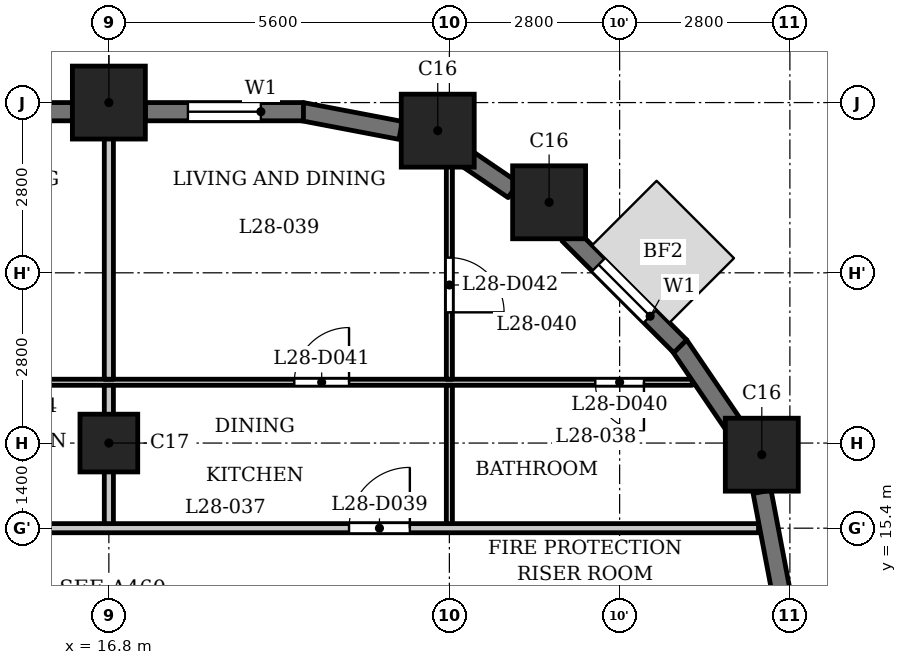
"""IFC4 building model, lengths in metres.
Left out: names, types, materials, properties, quantities, classifications, styles, units other than length and angle.
Written with IfcOpenShell. Run it as: python <this file> out.ifc"""

import sys

from ifc_helpers import new_model, si_unit, direction, frame, frame_2d, origin, origin_2d, place, context, subcontext, project, spatial, rectangle, extrude, element, fill, save


model = new_model("IFC4")
c1 = context("Model", 3, precision=1e-05, world=origin(), true_north=direction((0.0, 1.0)))
c2 = subcontext(c1, "Body", "Model", "MODEL_VIEW")
j1 = project(units=[si_unit("LENGTHUNIT", "METRE"), si_unit("PLANEANGLEUNIT", "RADIAN")], contexts=[c1])
p1 = place(None, origin())
s1 = spatial("IfcSite", under=j1, at=p1, CompositionType="ELEMENT")
p2 = place(p1, origin())
s2 = spatial("IfcBuilding", under=s1, at=p2, CompositionType="ELEMENT")
p3 = place(p2, frame((0.0, 0.0, 111.3)))
s3 = spatial("IfcBuildingStorey", under=s2, at=p3, CompositionType="ELEMENT", Elevation=111.3)
for number, where, z_axis, x_axis in (
    (1, (27.538, 16.609, 0.0), (0.0, 0.0, 1.0), (1.0, 0.0, 0.0)),
    (2, (24.04, 20.76, 0.0), (0.0, 0.0, 1.0), (1.0, 0.0, 0.0)),
    (3, (22.209, 21.938, 0.0), (0.0, 0.0, 1.0), (1.0, 0.0, 0.0)),
    (4, (16.8, 22.4, 0.0), (0.0, 0.0, 1.0), (1.0, 0.0, 0.0)),
):
    element("IfcColumn", number, at=place(p3, frame(where, z_axis=z_axis, x_axis=x_axis)), inside=s3, PredefinedType="COLUMN", context=c2, shape_type="SweptSolid", body=[
        extrude(rectangle(XDim=1.2, YDim=1.2, at=origin_2d()), origin(), (0.0, 0.0, 1.0), 3.5),
    ])
p4 = place(p3, frame((16.8, 16.8, 0.0), z_axis=(0.0, 0.0, 1.0), x_axis=(1.0, 0.0, 0.0)))
e5 = element("IfcColumn", 5, at=p4, inside=s3, PredefinedType="COLUMN", context=c2, shape_type="SweptSolid", body=[
    extrude(rectangle(XDim=0.95, YDim=0.95, at=origin_2d()), origin(), (0.0, 0.0, 1.0), 3.5),
])
for number, where, z_axis, x_axis in (
    (6, (27.853, 14.372, 0.0), (0.0, 0.0, 1.0), (-0.187, 0.982, 0.0)),
    (7, (27.11, 17.043, 0.0), (0.0, 0.0, 1.0), (-0.562, 0.827, 0.0)),
):
    element("IfcWall", number, at=place(p3, frame(where, z_axis=z_axis, x_axis=x_axis)), inside=s3, PredefinedType="SOLIDWALL", context=c2, shape_type="SweptSolid", body=[
        extrude(rectangle(XDim=1.656, YDim=0.3, at=frame_2d((0.828, 0.0))), origin(), (0.0, 0.0, 1.0), 2.4),
    ])
p5 = place(p3, frame((26.197, 18.391, 0.0), z_axis=(0.0, 0.0, 1.0), x_axis=(-0.707059830104, 0.707153729152, 0.0)))
e8 = element("IfcWall", 8, at=p5, inside=s3, PredefinedType="SOLIDWALL", context=c2, shape_type="SweptSolid", body=[
    extrude(rectangle(XDim=2.6, YDim=0.3, at=frame_2d((1.3, 0.0))), origin(), (0.0, 0.0, 1.0), 2.4),
])
p6 = place(p5, frame((0.7, 0.0, 0.6)))
e9 = element("IfcOpeningElement", 9, at=p6, cuts=e8, PredefinedType="OPENING", context=c2, shape_type="SweptSolid", body=[
    extrude(rectangle(XDim=1.2, YDim=1.55, at=frame_2d((0.6, 0.775))), frame((0.0, 0.16, 0.0), z_axis=(0.0, -1.0, 0.0), x_axis=(1.0, 0.0, 0.0)), (0.0, 0.0, 1.0), 0.32),
])
p7 = place(p3, frame((23.451, 20.96, 0.0), z_axis=(0.0, 0.0, 1.0), x_axis=(-0.827019434577, 0.562173331661, 0.0)))
e10 = element("IfcWall", 10, at=p7, inside=s3, PredefinedType="SOLIDWALL", context=c2, shape_type="SweptSolid", body=[
    extrude(rectangle(XDim=0.977, YDim=0.3, at=frame_2d((0.489, 0.0))), origin(), (0.0, 0.0, 1.0), 3.2),
])
p8 = place(p3, frame((21.599, 21.942, 0.0), z_axis=(0.0, 0.0, 1.0), x_axis=(-0.98228820662, 0.187376303559, 0.0)))
e11 = element("IfcWall", 11, at=p8, inside=s3, PredefinedType="SOLIDWALL", context=c2, shape_type="SweptSolid", body=[
    extrude(rectangle(XDim=1.656, YDim=0.3, at=frame_2d((0.828, 0.0))), origin(), (0.0, 0.0, 1.0), 2.4),
])
p9 = place(p3, frame((20.0, 22.25, 0.0), z_axis=(0.0, 0.0, 1.0), x_axis=(-1.0, 0.0, 0.0)))
e12 = element("IfcWall", 12, at=p9, inside=s3, PredefinedType="SOLIDWALL", context=c2, shape_type="SweptSolid", body=[
    extrude(rectangle(XDim=2.6, YDim=0.3, at=frame_2d((1.3, 0.0))), origin(), (0.0, 0.0, 1.0), 2.4),
])
p10 = place(p9, frame((0.7, 0.0, 0.6)))
e13 = element("IfcOpeningElement", 13, at=p10, cuts=e12, PredefinedType="OPENING", context=c2, shape_type="SweptSolid", body=[
    extrude(rectangle(XDim=1.2, YDim=1.55, at=frame_2d((0.6, 0.775))), frame((0.0, 0.16, 0.0), z_axis=(0.0, -1.0, 0.0), x_axis=(1.0, 0.0, 0.0)), (0.0, 0.0, 1.0), 0.32),
])
p11 = place(p3, frame((16.2, 22.25, 0.0), z_axis=(0.0, 0.0, 1.0), x_axis=(-1.0, 0.0, 0.0)))
e14 = element("IfcWall", 14, at=p11, inside=s3, PredefinedType="SOLIDWALL", context=c2, shape_type="SweptSolid", body=[
    extrude(rectangle(XDim=4.4, YDim=0.3, at=frame_2d((2.2, 0.0))), origin(), (0.0, 0.0, 1.0), 2.4),
])
p12 = place(p11, frame((0.4, 0.0, 1.2)))
e15 = element("IfcOpeningElement", 15, at=p12, cuts=e14, PredefinedType="OPENING", context=c2, shape_type="SweptSolid", body=[
    extrude(rectangle(XDim=3.6, YDim=0.95, at=frame_2d((1.8, 0.475))), frame((0.0, 0.16, 0.0), z_axis=(0.0, -1.0, 0.0), x_axis=(1.0, 0.0, 0.0)), (0.0, 0.0, 1.0), 0.32),
])
p13 = place(p3, frame((-27.484, 15.4, 0.0), z_axis=(0.0, 0.0, 1.0), x_axis=(1.0, 0.0, 0.0)))
e16 = element("IfcWall", 16, at=p13, inside=s3, PredefinedType="PARTITIONING", context=c2, shape_type="SweptSolid", body=[
    extrude(rectangle(XDim=54.968, YDim=0.15, at=frame_2d((27.484, 0.0))), origin(), (0.0, 0.0, 1.0), 3.2),
])
p14 = place(p13, frame((9.034, 0.0, 0.0)))
e17 = element("IfcOpeningElement", 17, at=p14, cuts=e16, PredefinedType="OPENING", context=c2, shape_type="SweptSolid", body=[
    extrude(rectangle(XDim=1.0, YDim=2.1, at=frame_2d((0.5, 1.05))), frame((0.0, 0.085, 0.0), z_axis=(0.0, -1.0, 0.0), x_axis=(1.0, 0.0, 0.0)), (0.0, 0.0, 1.0), 0.17),
])
p15 = place(p13, frame((14.634, 0.0, 0.0)))
e18 = element("IfcOpeningElement", 18, at=p15, cuts=e16, PredefinedType="OPENING", context=c2, shape_type="SweptSolid", body=[
    extrude(rectangle(XDim=1.0, YDim=2.1, at=frame_2d((0.5, 1.05))), frame((0.0, 0.085, 0.0), z_axis=(0.0, -1.0, 0.0), x_axis=(1.0, 0.0, 0.0)), (0.0, 0.0, 1.0), 0.17),
])
p16 = place(p13, frame((16.984, 0.0, 0.0)))
e19 = element("IfcOpeningElement", 19, at=p16, cuts=e16, PredefinedType="OPENING", context=c2, shape_type="SweptSolid", body=[
    extrude(rectangle(XDim=1.0, YDim=2.1, at=frame_2d((0.5, 1.05))), frame((0.0, 0.085, 0.0), z_axis=(0.0, -1.0, 0.0), x_axis=(1.0, 0.0, 0.0)), (0.0, 0.0, 1.0), 0.17),
])
p17 = place(p13, frame((28.084, 0.0, 0.0)))
e20 = element("IfcOpeningElement", 20, at=p17, cuts=e16, PredefinedType="OPENING", context=c2, shape_type="SweptSolid", body=[
    extrude(rectangle(XDim=1.0, YDim=2.1, at=frame_2d((0.5, 1.05))), frame((0.0, 0.085, 0.0), z_axis=(0.0, -1.0, 0.0), x_axis=(1.0, 0.0, 0.0)), (0.0, 0.0, 1.0), 0.17),
])
p18 = place(p13, frame((34.834, 0.0, 0.0)))
e21 = element("IfcOpeningElement", 21, at=p18, cuts=e16, PredefinedType="OPENING", context=c2, shape_type="SweptSolid", body=[
    extrude(rectangle(XDim=1.0, YDim=2.1, at=frame_2d((0.5, 1.05))), frame((0.0, 0.085, 0.0), z_axis=(0.0, -1.0, 0.0), x_axis=(1.0, 0.0, 0.0)), (0.0, 0.0, 1.0), 0.17),
])
p19 = place(p13, frame((41.884, 0.0, 0.0)))
e22 = element("IfcOpeningElement", 22, at=p19, cuts=e16, PredefinedType="OPENING", context=c2, shape_type="SweptSolid", body=[
    extrude(rectangle(XDim=1.0, YDim=2.1, at=frame_2d((0.5, 1.05))), frame((0.0, 0.085, 0.0), z_axis=(0.0, -1.0, 0.0), x_axis=(1.0, 0.0, 0.0)), (0.0, 0.0, 1.0), 0.17),
])
p20 = place(p13, frame((48.234, 0.0, 0.0)))
e23 = element("IfcOpeningElement", 23, at=p20, cuts=e16, PredefinedType="OPENING", context=c2, shape_type="SweptSolid", body=[
    extrude(rectangle(XDim=1.0, YDim=2.1, at=frame_2d((0.5, 1.05))), frame((0.0, 0.085, 0.0), z_axis=(0.0, -1.0, 0.0), x_axis=(1.0, 0.0, 0.0)), (0.0, 0.0, 1.0), 0.17),
])
p21 = place(p3, frame((-26.465, 17.8, 0.0), z_axis=(0.0, 0.0, 1.0), x_axis=(1.0, 0.0, 0.0)))
e24 = element("IfcWall", 24, at=p21, inside=s3, PredefinedType="PARTITIONING", context=c2, shape_type="SweptSolid", body=[
    extrude(rectangle(XDim=52.859, YDim=0.1, at=frame_2d((26.43, 0.0))), origin(), (0.0, 0.0, 1.0), 3.2),
])
p22 = place(p21, frame((2.697, 0.0, 0.0)))
e25 = element("IfcOpeningElement", 25, at=p22, cuts=e24, PredefinedType="OPENING", context=c2, shape_type="SweptSolid", body=[
    extrude(rectangle(XDim=0.8, YDim=2.1, at=frame_2d((0.4, 1.05))), frame((0.0, 0.06, 0.0), z_axis=(0.0, -1.0, 0.0), x_axis=(1.0, 0.0, 0.0)), (0.0, 0.0, 1.0), 0.12),
])
p23 = place(p21, frame((7.115, 0.0, 0.0)))
e26 = element("IfcOpeningElement", 26, at=p23, cuts=e24, PredefinedType="OPENING", context=c2, shape_type="SweptSolid", body=[
    extrude(rectangle(XDim=0.9, YDim=2.1, at=frame_2d((0.45, 1.05))), frame((0.0, 0.06, 0.0), z_axis=(0.0, -1.0, 0.0), x_axis=(1.0, 0.0, 0.0)), (0.0, 0.0, 1.0), 0.12),
])
p24 = place(p21, frame((10.315, 0.0, 0.0)))
e27 = element("IfcOpeningElement", 27, at=p24, cuts=e24, PredefinedType="OPENING", context=c2, shape_type="SweptSolid", body=[
    extrude(rectangle(XDim=0.8, YDim=2.1, at=frame_2d((0.4, 1.05))), frame((0.0, 0.06, 0.0), z_axis=(0.0, -1.0, 0.0), x_axis=(1.0, 0.0, 0.0)), (0.0, 0.0, 1.0), 0.12),
])
p25 = place(p21, frame((12.715, 0.0, 0.0)))
e28 = element("IfcOpeningElement", 28, at=p25, cuts=e24, PredefinedType="OPENING", context=c2, shape_type="SweptSolid", body=[
    extrude(rectangle(XDim=0.9, YDim=2.1, at=frame_2d((0.45, 1.05))), frame((0.0, 0.06, 0.0), z_axis=(0.0, -1.0, 0.0), x_axis=(1.0, 0.0, 0.0)), (0.0, 0.0, 1.0), 0.12),
])
p26 = place(p21, frame((21.515, 0.0, 0.0)))
e29 = element("IfcOpeningElement", 29, at=p26, cuts=e24, PredefinedType="OPENING", context=c2, shape_type="SweptSolid", body=[
    extrude(rectangle(XDim=0.8, YDim=2.1, at=frame_2d((0.4, 1.05))), frame((0.0, 0.06, 0.0), z_axis=(0.0, -1.0, 0.0), x_axis=(1.0, 0.0, 0.0)), (0.0, 0.0, 1.0), 0.12),
])
p27 = place(p21, frame((17.065, 0.0, 0.0)))
e30 = element("IfcOpeningElement", 30, at=p27, cuts=e24, PredefinedType="OPENING", context=c2, shape_type="SweptSolid", body=[
    extrude(rectangle(XDim=0.9, YDim=2.1, at=frame_2d((0.45, 1.05))), frame((0.0, 0.06, 0.0), z_axis=(0.0, -1.0, 0.0), x_axis=(1.0, 0.0, 0.0)), (0.0, 0.0, 1.0), 0.12),
])
p28 = place(p21, frame((30.365, 0.0, 0.0)))
e31 = element("IfcOpeningElement", 31, at=p28, cuts=e24, PredefinedType="OPENING", context=c2, shape_type="SweptSolid", body=[
    extrude(rectangle(XDim=0.8, YDim=2.1, at=frame_2d((0.4, 1.05))), frame((0.0, 0.06, 0.0), z_axis=(0.0, -1.0, 0.0), x_axis=(1.0, 0.0, 0.0)), (0.0, 0.0, 1.0), 0.12),
])
p29 = place(p21, frame((28.165, 0.0, 0.0)))
e32 = element("IfcOpeningElement", 32, at=p29, cuts=e24, PredefinedType="OPENING", context=c2, shape_type="SweptSolid", body=[
    extrude(rectangle(XDim=0.9, YDim=2.1, at=frame_2d((0.45, 1.05))), frame((0.0, 0.06, 0.0), z_axis=(0.0, -1.0, 0.0), x_axis=(1.0, 0.0, 0.0)), (0.0, 0.0, 1.0), 0.12),
])
p30 = place(p21, frame((36.115, 0.0, 0.0)))
e33 = element("IfcOpeningElement", 33, at=p30, cuts=e24, PredefinedType="OPENING", context=c2, shape_type="SweptSolid", body=[
    extrude(rectangle(XDim=0.8, YDim=2.1, at=frame_2d((0.4, 1.05))), frame((0.0, 0.06, 0.0), z_axis=(0.0, -1.0, 0.0), x_axis=(1.0, 0.0, 0.0)), (0.0, 0.0, 1.0), 0.12),
])
p31 = place(p21, frame((32.915, 0.0, 0.0)))
e34 = element("IfcOpeningElement", 34, at=p31, cuts=e24, PredefinedType="OPENING", context=c2, shape_type="SweptSolid", body=[
    extrude(rectangle(XDim=0.9, YDim=2.1, at=frame_2d((0.45, 1.05))), frame((0.0, 0.06, 0.0), z_axis=(0.0, -1.0, 0.0), x_axis=(1.0, 0.0, 0.0)), (0.0, 0.0, 1.0), 0.12),
])
p32 = place(p21, frame((38.315, 0.0, 0.0)))
e35 = element("IfcOpeningElement", 35, at=p32, cuts=e24, PredefinedType="OPENING", context=c2, shape_type="SweptSolid", body=[
    extrude(rectangle(XDim=0.8, YDim=2.1, at=frame_2d((0.4, 1.05))), frame((0.0, 0.06, 0.0), z_axis=(0.0, -1.0, 0.0), x_axis=(1.0, 0.0, 0.0)), (0.0, 0.0, 1.0), 0.12),
])
p33 = place(p21, frame((40.965, 0.0, 0.0)))
e36 = element("IfcOpeningElement", 36, at=p33, cuts=e24, PredefinedType="OPENING", context=c2, shape_type="SweptSolid", body=[
    extrude(rectangle(XDim=0.9, YDim=2.1, at=frame_2d((0.45, 1.05))), frame((0.0, 0.06, 0.0), z_axis=(0.0, -1.0, 0.0), x_axis=(1.0, 0.0, 0.0)), (0.0, 0.0, 1.0), 0.12),
])
p34 = place(p21, frame((51.265, 0.0, 0.0)))
e37 = element("IfcOpeningElement", 37, at=p34, cuts=e24, PredefinedType="OPENING", context=c2, shape_type="SweptSolid", body=[
    extrude(rectangle(XDim=0.8, YDim=2.1, at=frame_2d((0.4, 1.05))), frame((0.0, 0.06, 0.0), z_axis=(0.0, -1.0, 0.0), x_axis=(1.0, 0.0, 0.0)), (0.0, 0.0, 1.0), 0.12),
])
p35 = place(p21, frame((46.315, 0.0, 0.0)))
e38 = element("IfcOpeningElement", 38, at=p35, cuts=e24, PredefinedType="OPENING", context=c2, shape_type="SweptSolid", body=[
    extrude(rectangle(XDim=0.9, YDim=2.1, at=frame_2d((0.45, 1.05))), frame((0.0, 0.06, 0.0), z_axis=(0.0, -1.0, 0.0), x_axis=(1.0, 0.0, 0.0)), (0.0, 0.0, 1.0), 0.12),
])
p36 = place(p3, frame((16.8, 15.475, 0.0), z_axis=(0.0, 0.0, 1.0), x_axis=(0.0, 1.0, 0.0)))
e39 = element("IfcWall", 39, at=p36, inside=s3, PredefinedType="PARTITIONING", context=c2, shape_type="SweptSolid", body=[
    extrude(rectangle(XDim=2.275, YDim=0.15, at=frame_2d((1.137, 0.0))), origin(), (0.0, 0.0, 1.0), 3.2),
])
p37 = place(p3, frame((16.8, 17.85, 0.0), z_axis=(0.0, 0.0, 1.0), x_axis=(0.0, 1.0, 0.0)))
e40 = element("IfcWall", 40, at=p37, inside=s3, PredefinedType="PARTITIONING", context=c2, shape_type="SweptSolid", body=[
    extrude(rectangle(XDim=5.13, YDim=0.15, at=frame_2d((2.565, 0.0))), origin(), (0.0, 0.0, 1.0), 3.2),
])
p38 = place(p3, frame((22.4, 15.475, 0.0), z_axis=(0.0, 0.0, 1.0), x_axis=(0.0, 1.0, 0.0)))
e41 = element("IfcWall", 41, at=p38, inside=s3, PredefinedType="PARTITIONING", context=c2, shape_type="SweptSolid", body=[
    extrude(rectangle(XDim=2.275, YDim=0.1, at=frame_2d((1.137, 0.0))), origin(), (0.0, 0.0, 1.0), 3.2),
])
p39 = place(p3, frame((22.4, 17.85, 0.0), z_axis=(0.0, 0.0, 1.0), x_axis=(0.0, 1.0, 0.0)))
e42 = element("IfcWall", 42, at=p39, inside=s3, PredefinedType="PARTITIONING", context=c2, shape_type="SweptSolid", body=[
    extrude(rectangle(XDim=3.87, YDim=0.1, at=frame_2d((1.935, 0.0))), origin(), (0.0, 0.0, 1.0), 3.2),
])
p40 = place(p39, frame((1.1, 0.0, 0.0)))
e43 = element("IfcOpeningElement", 43, at=p40, cuts=e42, PredefinedType="OPENING", context=c2, shape_type="SweptSolid", body=[
    extrude(rectangle(XDim=0.9, YDim=2.1, at=frame_2d((0.45, 1.05))), frame((0.0, 0.06, 0.0), z_axis=(0.0, -1.0, 0.0), x_axis=(1.0, 0.0, 0.0)), (0.0, 0.0, 1.0), 0.12),
])
p41 = place(p20, origin())
e44 = element("IfcDoor", 44, at=p41, inside=s3, OperationType="SINGLE_SWING_LEFT", PredefinedType="DOOR", context=c2, shape_type="SweptSolid", body=[
    extrude(rectangle(XDim=1.0, YDim=2.1, at=frame_2d((0.5, 1.05))), frame((0.0, 0.025, 0.0), z_axis=(0.0, -1.0, 0.0), x_axis=(1.0, 0.0, 0.0)), (0.0, 0.0, 1.0), 0.05),
])
fill(e23, e44)
p42 = place(p34, origin())
e45 = element("IfcDoor", 45, at=p42, inside=s3, OperationType="SINGLE_SWING_RIGHT", PredefinedType="DOOR", context=c2, shape_type="SweptSolid", body=[
    extrude(rectangle(XDim=0.8, YDim=2.1, at=frame_2d((0.4, 1.05))), frame((0.0, 0.025, 0.0), z_axis=(0.0, -1.0, 0.0), x_axis=(1.0, 0.0, 0.0)), (0.0, 0.0, 1.0), 0.05),
])
fill(e37, e45)
p43 = place(p35, origin())
e46 = element("IfcDoor", 46, at=p43, inside=s3, OperationType="SINGLE_SWING_LEFT", PredefinedType="DOOR", context=c2, shape_type="SweptSolid", body=[
    extrude(rectangle(XDim=0.9, YDim=2.1, at=frame_2d((0.45, 1.05))), frame((0.0, 0.025, 0.0), z_axis=(0.0, -1.0, 0.0), x_axis=(1.0, 0.0, 0.0)), (0.0, 0.0, 1.0), 0.05),
])
fill(e38, e46)
p44 = place(p40, origin())
e47 = element("IfcDoor", 47, at=p44, inside=s3, OperationType="SINGLE_SWING_LEFT", PredefinedType="DOOR", context=c2, shape_type="SweptSolid", body=[
    extrude(rectangle(XDim=0.9, YDim=2.1, at=frame_2d((0.45, 1.05))), frame((0.0, 0.025, 0.0), z_axis=(0.0, -1.0, 0.0), x_axis=(1.0, 0.0, 0.0)), (0.0, 0.0, 1.0), 0.05),
])
fill(e43, e47)
p45 = place(p6, origin())
e48 = element("IfcWindow", 48, at=p45, inside=s3, PartitioningType="SINGLE_PANEL", PredefinedType="WINDOW", context=c2, shape_type="SweptSolid", body=[
    extrude(rectangle(XDim=1.2, YDim=1.55, at=frame_2d((0.6, 0.775))), frame((0.0, 0.03, 0.0), z_axis=(0.0, -1.0, 0.0), x_axis=(1.0, 0.0, 0.0)), (0.0, 0.0, 1.0), 0.06),
])
fill(e9, e48)
p46 = place(p10, origin())
e49 = element("IfcWindow", 49, at=p46, inside=s3, PartitioningType="SINGLE_PANEL", PredefinedType="WINDOW", context=c2, shape_type="SweptSolid", body=[
    extrude(rectangle(XDim=1.2, YDim=1.55, at=frame_2d((0.6, 0.775))), frame((0.0, 0.03, 0.0), z_axis=(0.0, -1.0, 0.0), x_axis=(1.0, 0.0, 0.0)), (0.0, 0.0, 1.0), 0.06),
])
fill(e13, e49)
save(model, sys.argv[1])
